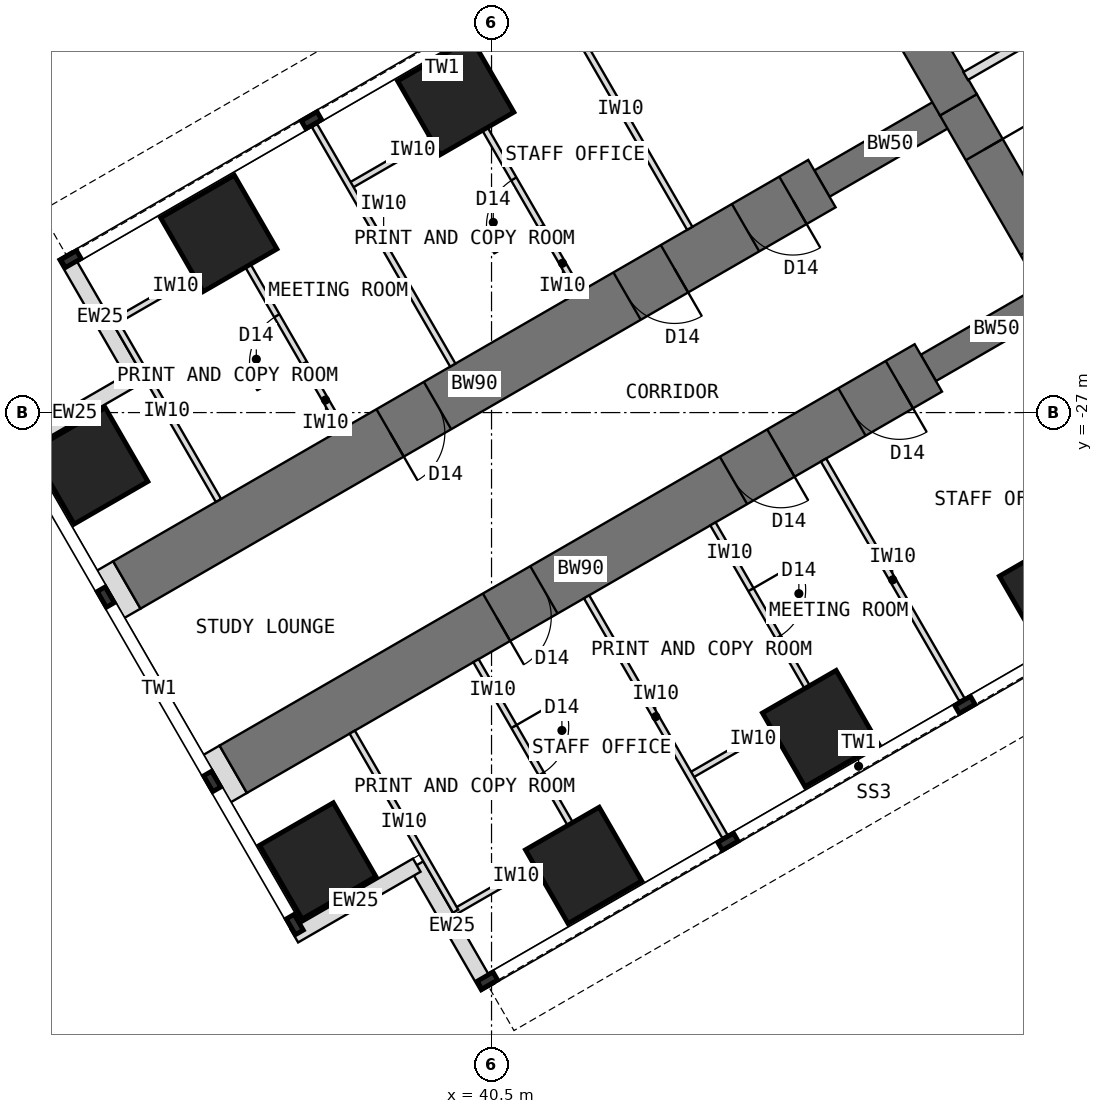
"""IFC4 building model, lengths in metres.
Left out: names, types, materials, properties, quantities, classifications, styles, units other than length and angle.
Written with IfcOpenShell. Run it as: python <this file> out.ifc"""

import sys

from ifc_helpers import new_model, si_unit, direction, frame, frame_2d, origin, origin_2d, place, context, subcontext, project, spatial, rectangle, extrude, element, fill, save


model = new_model("IFC4")
c1 = context("Model", 3, precision=1e-05, world=origin(), true_north=direction((0.0, 1.0)))
c2 = subcontext(c1, "Body", "Model", "MODEL_VIEW")
j1 = project(units=[si_unit("LENGTHUNIT", "METRE"), si_unit("PLANEANGLEUNIT", "RADIAN")], contexts=[c1])
p1 = place(None, origin())
s1 = spatial("IfcSite", under=j1, at=p1, CompositionType="ELEMENT")
p2 = place(p1, origin())
s2 = spatial("IfcBuilding", under=s1, at=p2, CompositionType="ELEMENT")
p3 = place(p2, frame((0.0, 0.0, 88.5)))
s3 = spatial("IfcBuildingStorey", under=s2, at=p3, CompositionType="ELEMENT", Elevation=88.5)
p4 = place(p3, frame((45.904, -18.0, 0.0), z_axis=(0.0, 0.0, 1.0), x_axis=(0.500024481964, -0.866011268655, 0.0)))
e1 = element("IfcWall", 1, at=p4, inside=s3, PredefinedType="SHEAR", context=c2, shape_type="SweptSolid", body=[
    extrude(rectangle(XDim=4.548, YDim=0.7, at=frame_2d((2.274, 0.0))), origin(), (0.0, 0.0, 1.0), 4.0),
])
p5 = place(p3, frame((48.178, -21.939, 0.0), z_axis=(0.0, 0.0, 1.0), x_axis=(0.500010275428, -0.866019471182, 0.0)))
e2 = element("IfcWall", 2, at=p5, inside=s3, PredefinedType="SHEAR", context=c2, shape_type="SweptSolid", body=[
    extrude(rectangle(XDim=3.5, YDim=0.7, at=frame_2d((1.75, 0.0))), origin(), (0.0, 0.0, 1.0), 4.0),
])
p6 = place(p5, frame((0.85, 0.0, 0.0)))
e3 = element("IfcOpeningElement", 3, at=p6, cuts=e2, PredefinedType="OPENING", context=c2, shape_type="SweptSolid", body=[
    extrude(rectangle(XDim=1.8, YDim=2.1, at=frame_2d((0.9, 1.05))), frame((0.0, 0.36, 0.0), z_axis=(0.0, -1.0, 0.0), x_axis=(1.0, 0.0, 0.0)), (0.0, 0.0, 1.0), 0.72),
])
p7 = place(p3, frame((49.928, -24.97, 0.0), z_axis=(0.0, 0.0, 1.0), x_axis=(-0.866031863473, -0.499988811324, 0.0)))
e4 = element("IfcWall", 4, at=p7, inside=s3, PredefinedType="SHEAR", context=c2, shape_type="SweptSolid", body=[
    extrude(rectangle(XDim=2.592, YDim=0.5, at=frame_2d((1.296, 0.0))), origin(), (0.0, 0.0, 1.0), 4.0),
])
p8 = place(p3, frame((47.684, -26.266, 0.0), z_axis=(0.0, 0.0, 1.0), x_axis=(-0.866027579429, -0.499996231654, 0.0)))
e5 = element("IfcWall", 5, at=p8, inside=s3, PredefinedType="SHEAR", context=c2, shape_type="SweptSolid", body=[
    extrude(rectangle(XDim=13.2, YDim=0.9, at=frame_2d((6.6, 0.0))), origin(), (0.0, 0.0, 1.0), 4.0),
])
p9 = place(p8, frame((0.55, 0.0, 0.0)))
e6 = element("IfcOpeningElement", 6, at=p9, cuts=e5, PredefinedType="OPENING", context=c2, shape_type="SweptSolid", body=[
    extrude(rectangle(XDim=0.9, YDim=2.1, at=frame_2d((0.45, 1.05))), frame((0.0, 0.46, 0.0), z_axis=(0.0, -1.0, 0.0), x_axis=(1.0, 0.0, 0.0)), (0.0, 0.0, 1.0), 0.92),
])
p10 = place(p8, frame((2.8, 0.0, 0.0)))
e7 = element("IfcOpeningElement", 7, at=p10, cuts=e5, PredefinedType="OPENING", context=c2, shape_type="SweptSolid", body=[
    extrude(rectangle(XDim=0.9, YDim=2.1, at=frame_2d((0.45, 1.05))), frame((0.0, 0.46, 0.0), z_axis=(0.0, -1.0, 0.0), x_axis=(1.0, 0.0, 0.0)), (0.0, 0.0, 1.0), 0.92),
])
p11 = place(p8, frame((7.3, 0.0, 0.0)))
e8 = element("IfcOpeningElement", 8, at=p11, cuts=e5, PredefinedType="OPENING", context=c2, shape_type="SweptSolid", body=[
    extrude(rectangle(XDim=0.9, YDim=2.1, at=frame_2d((0.45, 1.05))), frame((0.0, 0.46, 0.0), z_axis=(0.0, -1.0, 0.0), x_axis=(1.0, 0.0, 0.0)), (0.0, 0.0, 1.0), 0.92),
])
p12 = place(p3, frame((48.178, -21.939, 0.0), z_axis=(0.0, 0.0, 1.0), x_axis=(-0.866072649678, -0.499918158782, 0.0)))
e9 = element("IfcWall", 9, at=p12, inside=s3, PredefinedType="SHEAR", context=c2, shape_type="SweptSolid", body=[
    extrude(rectangle(XDim=2.592, YDim=0.5, at=frame_2d((1.296, 0.0))), origin(), (0.0, 0.0, 1.0), 4.0),
])
p13 = place(p3, frame((45.934, -23.234, 0.0), z_axis=(0.0, 0.0, 1.0), x_axis=(-0.866019570528, -0.500010103361, 0.0)))
e10 = element("IfcWall", 10, at=p13, inside=s3, PredefinedType="SHEAR", context=c2, shape_type="SweptSolid", body=[
    extrude(rectangle(XDim=13.2, YDim=0.9, at=frame_2d((6.6, 0.0))), origin(), (0.0, 0.0, 1.0), 4.0),
])
p14 = place(p13, frame((0.55, 0.0, 0.0)))
e11 = element("IfcOpeningElement", 11, at=p14, cuts=e10, PredefinedType="OPENING", context=c2, shape_type="SweptSolid", body=[
    extrude(rectangle(XDim=0.9, YDim=2.1, at=frame_2d((0.45, 1.05))), frame((0.0, 0.46, 0.0), z_axis=(0.0, -1.0, 0.0), x_axis=(1.0, 0.0, 0.0)), (0.0, 0.0, 1.0), 0.92),
])
p15 = place(p13, frame((2.8, 0.0, 0.0)))
e12 = element("IfcOpeningElement", 12, at=p15, cuts=e10, PredefinedType="OPENING", context=c2, shape_type="SweptSolid", body=[
    extrude(rectangle(XDim=0.9, YDim=2.1, at=frame_2d((0.45, 1.05))), frame((0.0, 0.46, 0.0), z_axis=(0.0, -1.0, 0.0), x_axis=(1.0, 0.0, 0.0)), (0.0, 0.0, 1.0), 0.92),
])
p16 = place(p13, frame((7.3, 0.0, 0.0)))
e13 = element("IfcOpeningElement", 13, at=p16, cuts=e10, PredefinedType="OPENING", context=c2, shape_type="SweptSolid", body=[
    extrude(rectangle(XDim=0.9, YDim=2.1, at=frame_2d((0.45, 1.05))), frame((0.0, 0.46, 0.0), z_axis=(0.0, -1.0, 0.0), x_axis=(1.0, 0.0, 0.0)), (0.0, 0.0, 1.0), 0.92),
])
for number, where, z_axis, x_axis in (
    (14, (49.809, -29.946, 0.0), (0.0, 0.0, 1.0), (0.866, 0.5, 0.0)),
    (15, (45.912, -32.196, 0.0), (0.0, 0.0, 1.0), (0.866, 0.5, 0.0)),
    (16, (39.912, -21.804, 0.0), (0.0, 0.0, 1.0), (0.866, 0.5, 0.0)),
    (17, (42.014, -34.446, 0.0), (0.0, 0.0, 1.0), (0.866, 0.5, 0.0)),
    (18, (36.014, -24.054, 0.0), (0.0, 0.0, 1.0), (0.866, 0.5, 0.0)),
    (19, (37.642, -34.373, 0.0), (0.0, 0.0, 1.0), (0.866, 0.5, 0.0)),
    (20, (33.892, -27.877, 0.0), (0.0, 0.0, 1.0), (0.866, 0.5, 0.0)),
):
    element("IfcColumn", number, at=place(p3, frame(where, z_axis=z_axis, x_axis=x_axis)), inside=s3, PredefinedType="COLUMN", context=c2, shape_type="SweptSolid", body=[
        extrude(rectangle(XDim=1.4, YDim=1.4, at=origin_2d()), origin(), (0.0, 0.0, 1.0), 4.0),
    ])
for number, where, z_axis, x_axis in (
    (21, (40.433, -36.456, 0.0), (0.0, 0.0, 1.0), (-0.5, 0.866, 0.0)),
    (22, (39.27, -34.443, 0.0), (0.0, 0.0, 1.0), (-0.866, -0.5, 0.0)),
    (23, (33.483, -24.419, 0.0), (0.0, 0.0, 1.0), (0.5, -0.866, 0.0)),
    (24, (34.645, -26.432, 0.0), (0.0, 0.0, 1.0), (-0.866, -0.5, 0.0)),
):
    element("IfcWall", number, at=place(p3, frame(where, z_axis=z_axis, x_axis=x_axis)), inside=s3, PredefinedType="STANDARD", context=c2, shape_type="SweptSolid", body=[
        extrude(rectangle(XDim=2.325, YDim=0.25, at=frame_2d((1.163, 0.0))), origin(), (0.0, 0.0, 1.0), 3.7),
    ])
for number, where, z_axis, x_axis in (
    (25, (36.252, -32.865, 0.0), (0.0, 0.0, 1.0), (-0.866, -0.5, 0.0)),
    (26, (34.502, -29.834, 0.0), (0.0, 0.0, 1.0), (-0.866, -0.5, 0.0)),
):
    element("IfcWall", number, at=place(p3, frame(where, z_axis=z_axis, x_axis=x_axis)), inside=s3, PredefinedType="PARTITIONING", context=c2, shape_type="SweptSolid", body=[
        extrude(rectangle(XDim=0.31, YDim=0.9, at=frame_2d((0.155, 0.0))), origin(), (0.0, 0.0, 1.0), 3.7),
    ])
for number, where, z_axis, x_axis in (
    (27, (45.96, -27.78, 0.0), (0.0, 0.0, 1.0), (0.5, -0.866, 0.0)),
    (28, (42.063, -30.03, 0.0), (0.0, 0.0, 1.0), (0.5, -0.866, 0.0)),
):
    element("IfcWall", number, at=place(p3, frame(where, z_axis=z_axis, x_axis=x_axis)), inside=s3, PredefinedType="PARTITIONING", context=c2, shape_type="SweptSolid", body=[
        extrude(rectangle(XDim=4.55, YDim=0.1, at=frame_2d((2.275, 0.0))), origin(), (0.0, 0.0, 1.0), 3.7),
    ])
p17 = place(p3, frame((45.842, -31.775, 0.0), z_axis=(0.0, 0.0, 1.0), x_axis=(-0.866006032174, -0.500033551112, 0.0)))
e29 = element("IfcWall", 29, at=p17, inside=s3, PredefinedType="PARTITIONING", context=c2, shape_type="SweptSolid", body=[
    extrude(rectangle(XDim=2.4, YDim=0.1, at=frame_2d((1.2, 0.0))), origin(), (0.0, 0.0, 1.0), 3.7),
])
p18 = place(p3, frame((44.141, -28.83, 0.0), z_axis=(0.0, 0.0, 1.0), x_axis=(0.500062241894, -0.865989465428, 0.0)))
e30 = element("IfcWall", 30, at=p18, inside=s3, PredefinedType="PARTITIONING", context=c2, shape_type="SweptSolid", body=[
    extrude(rectangle(XDim=3.4, YDim=0.1, at=frame_2d((1.7, 0.0))), origin(), (0.0, 0.0, 1.0), 3.7),
])
p19 = place(p18, frame((1.25, 0.0, 0.0)))
e31 = element("IfcOpeningElement", 31, at=p19, cuts=e30, PredefinedType="OPENING", context=c2, shape_type="SweptSolid", body=[
    extrude(rectangle(XDim=0.9, YDim=2.1, at=frame_2d((0.45, 1.05))), frame((0.0, 0.06, 0.0), z_axis=(0.0, -1.0, 0.0), x_axis=(1.0, 0.0, 0.0)), (0.0, 0.0, 1.0), 0.12),
])
p20 = place(p3, frame((41.944, -34.025, 0.0), z_axis=(0.0, 0.0, 1.0), x_axis=(-0.865980596518, -0.500077600433, 0.0)))
e32 = element("IfcWall", 32, at=p20, inside=s3, PredefinedType="PARTITIONING", context=c2, shape_type="SweptSolid", body=[
    extrude(rectangle(XDim=2.4, YDim=0.1, at=frame_2d((1.2, 0.0))), origin(), (0.0, 0.0, 1.0), 3.7),
])
p21 = place(p3, frame((40.244, -31.08, 0.0), z_axis=(0.0, 0.0, 1.0), x_axis=(0.500008388397, -0.866020560687, 0.0)))
e33 = element("IfcWall", 33, at=p21, inside=s3, PredefinedType="PARTITIONING", context=c2, shape_type="SweptSolid", body=[
    extrude(rectangle(XDim=3.4, YDim=0.1, at=frame_2d((1.7, 0.0))), origin(), (0.0, 0.0, 1.0), 3.7),
])
p22 = place(p21, frame((1.25, 0.0, 0.0)))
e34 = element("IfcOpeningElement", 34, at=p22, cuts=e33, PredefinedType="OPENING", context=c2, shape_type="SweptSolid", body=[
    extrude(rectangle(XDim=0.9, YDim=2.1, at=frame_2d((0.45, 1.05))), frame((0.0, 0.06, 0.0), z_axis=(0.0, -1.0, 0.0), x_axis=(1.0, 0.0, 0.0)), (0.0, 0.0, 1.0), 0.12),
])
p23 = place(p3, frame((38.209, -32.255, 0.0), z_axis=(0.0, 0.0, 1.0), x_axis=(0.500008388397, -0.866020560687, 0.0)))
e35 = element("IfcWall", 35, at=p23, inside=s3, PredefinedType="PARTITIONING", context=c2, shape_type="SweptSolid", body=[
    extrude(rectangle(XDim=3.4, YDim=0.1, at=frame_2d((1.7, 0.0))), origin(), (0.0, 0.0, 1.0), 3.7),
])
for number, where, z_axis, x_axis in (
    (36, (43.76, -23.97, 0.0), (0.0, 0.0, 1.0), (-0.5, 0.866, 0.0)),
    (37, (39.863, -26.22, 0.0), (0.0, 0.0, 1.0), (-0.5, 0.866, 0.0)),
):
    element("IfcWall", number, at=place(p3, frame(where, z_axis=z_axis, x_axis=x_axis)), inside=s3, PredefinedType="PARTITIONING", context=c2, shape_type="SweptSolid", body=[
        extrude(rectangle(XDim=4.55, YDim=0.1, at=frame_2d((2.275, 0.0))), origin(), (0.0, 0.0, 1.0), 3.7),
    ])
p24 = place(p3, frame((40.241, -22.075, 0.0), z_axis=(0.0, 0.0, 1.0), x_axis=(-0.866024647952, -0.500001309137, 0.0)))
e38 = element("IfcWall", 38, at=p24, inside=s3, PredefinedType="PARTITIONING", context=c2, shape_type="SweptSolid", body=[
    extrude(rectangle(XDim=2.4, YDim=0.1, at=frame_2d((1.2, 0.0))), origin(), (0.0, 0.0, 1.0), 3.7),
])
p25 = place(p3, frame((41.941, -25.02, 0.0), z_axis=(0.0, 0.0, 1.0), x_axis=(-0.499977295307, 0.866038511948, 0.0)))
e39 = element("IfcWall", 39, at=p25, inside=s3, PredefinedType="PARTITIONING", context=c2, shape_type="SweptSolid", body=[
    extrude(rectangle(XDim=3.4, YDim=0.1, at=frame_2d((1.7, 0.0))), origin(), (0.0, 0.0, 1.0), 3.7),
])
p26 = place(p25, frame((1.25, 0.0, 0.0)))
e40 = element("IfcOpeningElement", 40, at=p26, cuts=e39, PredefinedType="OPENING", context=c2, shape_type="SweptSolid", body=[
    extrude(rectangle(XDim=0.9, YDim=2.1, at=frame_2d((0.45, 1.05))), frame((0.0, 0.06, 0.0), z_axis=(0.0, -1.0, 0.0), x_axis=(1.0, 0.0, 0.0)), (0.0, 0.0, 1.0), 0.12),
])
p27 = place(p3, frame((36.344, -24.325, 0.0), z_axis=(0.0, 0.0, 1.0), x_axis=(-0.866024647952, -0.500001309137, 0.0)))
e41 = element("IfcWall", 41, at=p27, inside=s3, PredefinedType="PARTITIONING", context=c2, shape_type="SweptSolid", body=[
    extrude(rectangle(XDim=2.4, YDim=0.1, at=frame_2d((1.2, 0.0))), origin(), (0.0, 0.0, 1.0), 3.7),
])
p28 = place(p3, frame((38.044, -27.27, 0.0), z_axis=(0.0, 0.0, 1.0), x_axis=(-0.500031147688, 0.866007419912, 0.0)))
e42 = element("IfcWall", 42, at=p28, inside=s3, PredefinedType="PARTITIONING", context=c2, shape_type="SweptSolid", body=[
    extrude(rectangle(XDim=3.4, YDim=0.1, at=frame_2d((1.7, 0.0))), origin(), (0.0, 0.0, 1.0), 3.7),
])
p29 = place(p28, frame((1.25, 0.0, 0.0)))
e43 = element("IfcOpeningElement", 43, at=p29, cuts=e42, PredefinedType="OPENING", context=c2, shape_type="SweptSolid", body=[
    extrude(rectangle(XDim=0.9, YDim=2.1, at=frame_2d((0.45, 1.05))), frame((0.0, 0.06, 0.0), z_axis=(0.0, -1.0, 0.0), x_axis=(1.0, 0.0, 0.0)), (0.0, 0.0, 1.0), 0.12),
])
p30 = place(p3, frame((36.009, -28.445, 0.0), z_axis=(0.0, 0.0, 1.0), x_axis=(-0.500031147688, 0.866007419912, 0.0)))
e44 = element("IfcWall", 44, at=p30, inside=s3, PredefinedType="PARTITIONING", context=c2, shape_type="SweptSolid", body=[
    extrude(rectangle(XDim=3.4, YDim=0.1, at=frame_2d((1.7, 0.0))), origin(), (0.0, 0.0, 1.0), 3.7),
])
p31 = place(p3, frame((48.298, -21.466, 0.0), z_axis=(0.0, 0.0, 1.0), x_axis=(0.866021148949, 0.500007369519, 0.0)))
e45 = element("IfcWall", 45, at=p31, inside=s3, PredefinedType="PARTITIONING", context=c2, shape_type="SweptSolid", body=[
    extrude(rectangle(XDim=4.426, YDim=0.15, at=frame_2d((2.213, 0.0))), origin(), (0.0, 0.0, 1.0), 3.7),
])
p32 = place(p31, frame((2.598, 0.0, 0.0)))
e46 = element("IfcOpeningElement", 46, at=p32, cuts=e45, PredefinedType="OPENING", context=c2, shape_type="SweptSolid", body=[
    extrude(rectangle(XDim=1.0, YDim=2.1, at=frame_2d((0.5, 1.05))), frame((0.0, 0.085, 0.0), z_axis=(0.0, -1.0, 0.0), x_axis=(1.0, 0.0, 0.0)), (0.0, 0.0, 1.0), 0.17),
])
p33 = place(p6, origin())
e47 = element("IfcDoor", 47, at=p33, inside=s3, OperationType="DOUBLE_DOOR_DOUBLE_SWING", PredefinedType="DOOR", context=c2, shape_type="SweptSolid", body=[
    extrude(rectangle(XDim=1.72, YDim=2.06, at=frame_2d((0.9, 1.03))), frame((0.0, 0.025, 0.0), z_axis=(0.0, -1.0, 0.0), x_axis=(1.0, 0.0, 0.0)), (0.0, 0.0, 1.0), 0.05),
    extrude(rectangle(XDim=0.04, YDim=2.1, at=frame_2d((0.02, 1.05))), frame((0.0, 0.35, 0.0), z_axis=(0.0, -1.0, 0.0), x_axis=(1.0, 0.0, 0.0)), (0.0, 0.0, 1.0), 0.699),
    extrude(rectangle(XDim=0.04, YDim=2.1, at=frame_2d((1.78, 1.05))), frame((0.0, 0.35, 0.0), z_axis=(0.0, -1.0, 0.0), x_axis=(1.0, 0.0, 0.0)), (0.0, 0.0, 1.0), 0.699),
    extrude(rectangle(XDim=1.72, YDim=0.04, at=frame_2d((0.9, 2.08))), frame((0.0, 0.35, 0.0), z_axis=(0.0, -1.0, 0.0), x_axis=(1.0, 0.0, 0.0)), (0.0, 0.0, 1.0), 0.699),
])
fill(e3, e47)
p34 = place(p19, origin())
e48 = element("IfcDoor", 48, at=p34, inside=s3, OperationType="SINGLE_SWING_LEFT", PredefinedType="DOOR", context=c2, shape_type="SweptSolid", body=[
    extrude(rectangle(XDim=0.9, YDim=2.1, at=frame_2d((0.45, 1.05))), frame((0.0, 0.025, 0.0), z_axis=(0.0, -1.0, 0.0), x_axis=(1.0, 0.0, 0.0)), (0.0, 0.0, 1.0), 0.05),
])
fill(e31, e48)
p35 = place(p22, origin())
e49 = element("IfcDoor", 49, at=p35, inside=s3, OperationType="SINGLE_SWING_LEFT", PredefinedType="DOOR", context=c2, shape_type="SweptSolid", body=[
    extrude(rectangle(XDim=0.9, YDim=2.1, at=frame_2d((0.45, 1.05))), frame((0.0, 0.025, 0.0), z_axis=(0.0, -1.0, 0.0), x_axis=(1.0, 0.0, 0.0)), (0.0, 0.0, 1.0), 0.05),
])
fill(e34, e49)
p36 = place(p26, origin())
e50 = element("IfcDoor", 50, at=p36, inside=s3, OperationType="SINGLE_SWING_LEFT", PredefinedType="DOOR", context=c2, shape_type="SweptSolid", body=[
    extrude(rectangle(XDim=0.9, YDim=2.1, at=frame_2d((0.45, 1.05))), frame((0.0, 0.025, 0.0), z_axis=(0.0, -1.0, 0.0), x_axis=(1.0, 0.0, 0.0)), (0.0, 0.0, 1.0), 0.05),
])
fill(e40, e50)
p37 = place(p29, origin())
e51 = element("IfcDoor", 51, at=p37, inside=s3, OperationType="SINGLE_SWING_LEFT", PredefinedType="DOOR", context=c2, shape_type="SweptSolid", body=[
    extrude(rectangle(XDim=0.9, YDim=2.1, at=frame_2d((0.45, 1.05))), frame((0.0, 0.025, 0.0), z_axis=(0.0, -1.0, 0.0), x_axis=(1.0, 0.0, 0.0)), (0.0, 0.0, 1.0), 0.05),
])
fill(e43, e51)
p38 = place(p9, origin())
e52 = element("IfcDoor", 52, at=p38, inside=s3, OperationType="SINGLE_SWING_LEFT", PredefinedType="DOOR", context=c2, shape_type="SweptSolid", body=[
    extrude(rectangle(XDim=0.82, YDim=2.06, at=frame_2d((0.45, 1.03))), frame((0.0, 0.025, 0.0), z_axis=(0.0, -1.0, 0.0), x_axis=(1.0, 0.0, 0.0)), (0.0, 0.0, 1.0), 0.05),
    extrude(rectangle(XDim=0.04, YDim=2.1, at=frame_2d((0.02, 1.05))), frame((0.0, 0.45, 0.0), z_axis=(0.0, -1.0, 0.0), x_axis=(1.0, 0.0, 0.0)), (0.0, 0.0, 1.0), 0.899),
    extrude(rectangle(XDim=0.04, YDim=2.1, at=frame_2d((0.88, 1.05))), frame((0.0, 0.45, 0.0), z_axis=(0.0, -1.0, 0.0), x_axis=(1.0, 0.0, 0.0)), (0.0, 0.0, 1.0), 0.899),
    extrude(rectangle(XDim=0.82, YDim=0.04, at=frame_2d((0.45, 2.08))), frame((0.0, 0.45, 0.0), z_axis=(0.0, -1.0, 0.0), x_axis=(1.0, 0.0, 0.0)), (0.0, 0.0, 1.0), 0.899),
])
fill(e6, e52)
p39 = place(p10, origin())
e53 = element("IfcDoor", 53, at=p39, inside=s3, OperationType="SINGLE_SWING_LEFT", PredefinedType="DOOR", context=c2, shape_type="SweptSolid", body=[
    extrude(rectangle(XDim=0.82, YDim=2.06, at=frame_2d((0.45, 1.03))), frame((0.0, 0.025, 0.0), z_axis=(0.0, -1.0, 0.0), x_axis=(1.0, 0.0, 0.0)), (0.0, 0.0, 1.0), 0.05),
    extrude(rectangle(XDim=0.04, YDim=2.1, at=frame_2d((0.02, 1.05))), frame((0.0, 0.45, 0.0), z_axis=(0.0, -1.0, 0.0), x_axis=(1.0, 0.0, 0.0)), (0.0, 0.0, 1.0), 0.899),
    extrude(rectangle(XDim=0.04, YDim=2.1, at=frame_2d((0.88, 1.05))), frame((0.0, 0.45, 0.0), z_axis=(0.0, -1.0, 0.0), x_axis=(1.0, 0.0, 0.0)), (0.0, 0.0, 1.0), 0.899),
    extrude(rectangle(XDim=0.82, YDim=0.04, at=frame_2d((0.45, 2.08))), frame((0.0, 0.45, 0.0), z_axis=(0.0, -1.0, 0.0), x_axis=(1.0, 0.0, 0.0)), (0.0, 0.0, 1.0), 0.899),
])
fill(e7, e53)
p40 = place(p11, origin())
e54 = element("IfcDoor", 54, at=p40, inside=s3, OperationType="SINGLE_SWING_RIGHT", PredefinedType="DOOR", context=c2, shape_type="SweptSolid", body=[
    extrude(rectangle(XDim=0.82, YDim=2.06, at=frame_2d((0.45, 1.03))), frame((0.0, 0.025, 0.0), z_axis=(0.0, -1.0, 0.0), x_axis=(1.0, 0.0, 0.0)), (0.0, 0.0, 1.0), 0.05),
    extrude(rectangle(XDim=0.04, YDim=2.1, at=frame_2d((0.02, 1.05))), frame((0.0, 0.45, 0.0), z_axis=(0.0, -1.0, 0.0), x_axis=(1.0, 0.0, 0.0)), (0.0, 0.0, 1.0), 0.899),
    extrude(rectangle(XDim=0.04, YDim=2.1, at=frame_2d((0.88, 1.05))), frame((0.0, 0.45, 0.0), z_axis=(0.0, -1.0, 0.0), x_axis=(1.0, 0.0, 0.0)), (0.0, 0.0, 1.0), 0.899),
    extrude(rectangle(XDim=0.82, YDim=0.04, at=frame_2d((0.45, 2.08))), frame((0.0, 0.45, 0.0), z_axis=(0.0, -1.0, 0.0), x_axis=(1.0, 0.0, 0.0)), (0.0, 0.0, 1.0), 0.899),
])
fill(e8, e54)
p41 = place(p14, origin())
e55 = element("IfcDoor", 55, at=p41, inside=s3, OperationType="SINGLE_SWING_LEFT", PredefinedType="DOOR", context=c2, shape_type="SweptSolid", body=[
    extrude(rectangle(XDim=0.82, YDim=2.06, at=frame_2d((0.45, 1.03))), frame((0.0, 0.025, 0.0), z_axis=(0.0, -1.0, 0.0), x_axis=(1.0, 0.0, 0.0)), (0.0, 0.0, 1.0), 0.05),
    extrude(rectangle(XDim=0.04, YDim=2.1, at=frame_2d((0.02, 1.05))), frame((0.0, 0.45, 0.0), z_axis=(0.0, -1.0, 0.0), x_axis=(1.0, 0.0, 0.0)), (0.0, 0.0, 1.0), 0.899),
    extrude(rectangle(XDim=0.04, YDim=2.1, at=frame_2d((0.88, 1.05))), frame((0.0, 0.45, 0.0), z_axis=(0.0, -1.0, 0.0), x_axis=(1.0, 0.0, 0.0)), (0.0, 0.0, 1.0), 0.899),
    extrude(rectangle(XDim=0.82, YDim=0.04, at=frame_2d((0.45, 2.08))), frame((0.0, 0.45, 0.0), z_axis=(0.0, -1.0, 0.0), x_axis=(1.0, 0.0, 0.0)), (0.0, 0.0, 1.0), 0.899),
])
fill(e11, e55)
p42 = place(p15, origin())
e56 = element("IfcDoor", 56, at=p42, inside=s3, OperationType="SINGLE_SWING_LEFT", PredefinedType="DOOR", context=c2, shape_type="SweptSolid", body=[
    extrude(rectangle(XDim=0.82, YDim=2.06, at=frame_2d((0.45, 1.03))), frame((0.0, 0.025, 0.0), z_axis=(0.0, -1.0, 0.0), x_axis=(1.0, 0.0, 0.0)), (0.0, 0.0, 1.0), 0.05),
    extrude(rectangle(XDim=0.04, YDim=2.1, at=frame_2d((0.02, 1.05))), frame((0.0, 0.45, 0.0), z_axis=(0.0, -1.0, 0.0), x_axis=(1.0, 0.0, 0.0)), (0.0, 0.0, 1.0), 0.899),
    extrude(rectangle(XDim=0.04, YDim=2.1, at=frame_2d((0.88, 1.05))), frame((0.0, 0.45, 0.0), z_axis=(0.0, -1.0, 0.0), x_axis=(1.0, 0.0, 0.0)), (0.0, 0.0, 1.0), 0.899),
    extrude(rectangle(XDim=0.82, YDim=0.04, at=frame_2d((0.45, 2.08))), frame((0.0, 0.45, 0.0), z_axis=(0.0, -1.0, 0.0), x_axis=(1.0, 0.0, 0.0)), (0.0, 0.0, 1.0), 0.899),
])
fill(e12, e56)
p43 = place(p16, origin())
e57 = element("IfcDoor", 57, at=p43, inside=s3, OperationType="SINGLE_SWING_RIGHT", PredefinedType="DOOR", context=c2, shape_type="SweptSolid", body=[
    extrude(rectangle(XDim=0.82, YDim=2.06, at=frame_2d((0.45, 1.03))), frame((0.0, 0.025, 0.0), z_axis=(0.0, -1.0, 0.0), x_axis=(1.0, 0.0, 0.0)), (0.0, 0.0, 1.0), 0.05),
    extrude(rectangle(XDim=0.04, YDim=2.1, at=frame_2d((0.02, 1.05))), frame((0.0, 0.45, 0.0), z_axis=(0.0, -1.0, 0.0), x_axis=(1.0, 0.0, 0.0)), (0.0, 0.0, 1.0), 0.899),
    extrude(rectangle(XDim=0.04, YDim=2.1, at=frame_2d((0.88, 1.05))), frame((0.0, 0.45, 0.0), z_axis=(0.0, -1.0, 0.0), x_axis=(1.0, 0.0, 0.0)), (0.0, 0.0, 1.0), 0.899),
    extrude(rectangle(XDim=0.82, YDim=0.04, at=frame_2d((0.45, 2.08))), frame((0.0, 0.45, 0.0), z_axis=(0.0, -1.0, 0.0), x_axis=(1.0, 0.0, 0.0)), (0.0, 0.0, 1.0), 0.899),
])
fill(e13, e57)
save(model, sys.argv[1])
